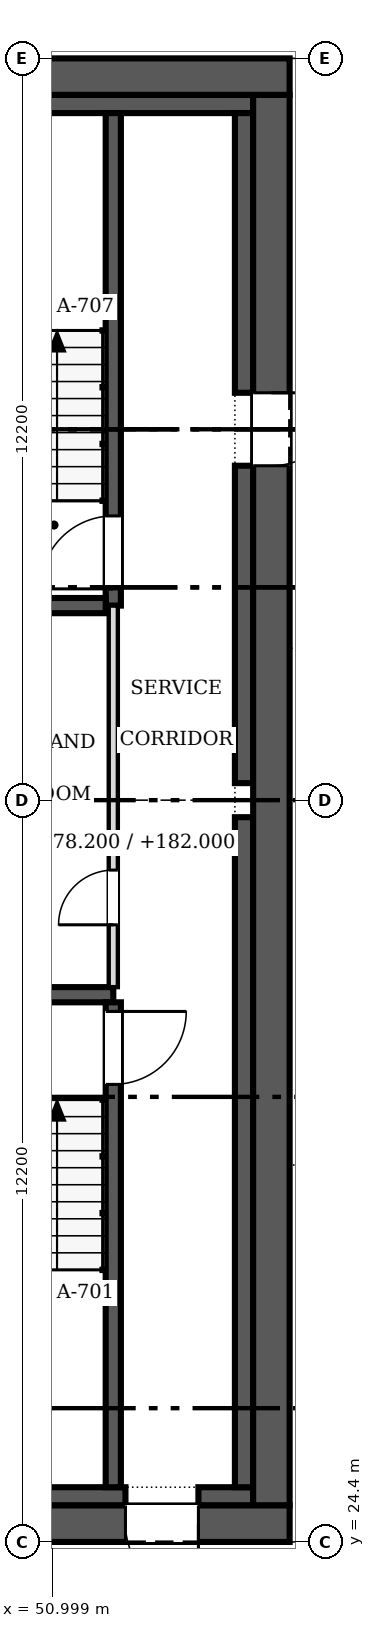
"""IFC4 building model, lengths in metres.
Left out: names, types, materials, properties, quantities, classifications, styles, units other than length and angle.
Written with IfcOpenShell. Run it as: python <this file> out.ifc"""

import sys

from ifc_helpers import new_model, si_unit, direction, frame, frame_2d, origin, place, context, subcontext, project, spatial, rectangle, extrude, source, transform, mapped, element, fill, save


model = new_model("IFC4")
c1 = context("Model", 3, precision=1e-05, world=origin(), true_north=direction((0.0, 1.0)))
c2 = subcontext(c1, "Body", "Model", "MODEL_VIEW")
j1 = project(units=[si_unit("LENGTHUNIT", "METRE"), si_unit("PLANEANGLEUNIT", "RADIAN")], contexts=[c1])
p1 = place(None, origin())
s1 = spatial("IfcSite", under=j1, at=p1, CompositionType="ELEMENT")
p2 = place(p1, origin())
s2 = spatial("IfcBuilding", under=s1, at=p2, CompositionType="ELEMENT")
p3 = place(p2, frame((0.0, 0.0, 178.2)))
s3 = spatial("IfcBuildingStorey", under=s2, at=p3, CompositionType="ELEMENT", Elevation=178.2)
p4 = place(p3, frame((54.9, 24.7, 0.0), z_axis=(0.0, 0.0, 1.0), x_axis=(-1.0, 0.0, 0.0)))
e1 = element("IfcWall", 1, at=p4, inside=s3, PredefinedType="SHEAR", context=c2, shape_type="SweptSolid", body=[
    extrude(rectangle(XDim=24.4, YDim=0.6, at=frame_2d((12.2, 0.0))), origin(), (0.0, 0.0, 1.0), 3.8),
])
m1 = source(origin(), c2, "Body", "SweptSolid", [
    extrude(rectangle(XDim=1.2, YDim=2.1, at=frame_2d((0.6, 1.05))), frame((0.0, 0.31, 0.0), z_axis=(0.0, -1.0, 0.0), x_axis=(1.0, 0.0, 0.0)), (0.0, 0.0, 1.0), 0.62),
])
p5 = place(p4, frame((1.5, 0.0, 0.0)))
e2 = element("IfcOpeningElement", 2, at=p5, cuts=e1, PredefinedType="OPENING", context=c2, shape_type="MappedRepresentation", body=[
    mapped(m1, transform((0.0, 0.0, 0.0), scale=1.0)),
])
p6 = place(p3, frame((30.5, 48.5, 0.0), z_axis=(0.0, 0.0, 1.0), x_axis=(1.0, 0.0, 0.0)))
e3 = element("IfcWall", 3, at=p6, inside=s3, PredefinedType="SHEAR", context=c2, shape_type="SweptSolid", body=[
    extrude(rectangle(XDim=24.4, YDim=0.6, at=frame_2d((12.2, 0.0))), origin(), (0.0, 0.0, 1.0), 3.8),
])
p7 = place(p3, frame((54.6, 48.2, 0.0), z_axis=(0.0, 0.0, 1.0), x_axis=(0.0, -1.0, 0.0)))
e4 = element("IfcWall", 4, at=p7, inside=s3, PredefinedType="SHEAR", context=c2, shape_type="SweptSolid", body=[
    extrude(rectangle(XDim=23.2, YDim=0.6, at=frame_2d((11.6, 0.0))), origin(), (0.0, 0.0, 1.0), 3.8),
])
p8 = place(p7, frame((4.9, 0.0, 0.0)))
e5 = element("IfcOpeningElement", 5, at=p8, cuts=e4, PredefinedType="OPENING", context=c2, shape_type="MappedRepresentation", body=[
    mapped(m1, transform((0.0, 0.0, 0.0), scale=1.0)),
])
p9 = place(p3, frame((31.1, 25.15, 0.0), z_axis=(0.0, 0.0, 1.0), x_axis=(1.0, 0.0, 0.0)))
e6 = element("IfcWall", 6, at=p9, inside=s3, PredefinedType="SOLIDWALL", context=c2, shape_type="SweptSolid", body=[
    extrude(rectangle(XDim=21.1, YDim=0.3, at=frame_2d((10.55, 0.0))), origin(), (0.0, 0.0, 1.0), 3.8),
])
p10 = place(p3, frame((53.4, 25.15, 0.0), z_axis=(0.0, 0.0, 1.0), x_axis=(1.0, 0.0, 0.0)))
e7 = element("IfcWall", 7, at=p10, inside=s3, PredefinedType="SOLIDWALL", context=c2, shape_type="SweptSolid", body=[
    extrude(rectangle(XDim=0.9, YDim=0.3, at=frame_2d((0.45, 0.0))), origin(), (0.0, 0.0, 1.0), 3.8),
])
p11 = place(p3, frame((31.1, 48.05, 0.0), z_axis=(0.0, 0.0, 1.0), x_axis=(1.0, 0.0, 0.0)))
e8 = element("IfcWall", 8, at=p11, inside=s3, PredefinedType="SOLIDWALL", context=c2, shape_type="SweptSolid", body=[
    extrude(rectangle(XDim=23.2, YDim=0.3, at=frame_2d((11.6, 0.0))), origin(), (0.0, 0.0, 1.0), 3.8),
])
p12 = place(p3, frame((54.15, 25.3, 0.0), z_axis=(0.0, 0.0, 1.0), x_axis=(0.0, 1.0, 0.0)))
e9 = element("IfcWall", 9, at=p12, inside=s3, PredefinedType="SOLIDWALL", context=c2, shape_type="SweptSolid", body=[
    extrude(rectangle(XDim=11.02, YDim=0.3, at=frame_2d((5.51, 0.0))), origin(), (0.0, 0.0, 1.0), 3.8),
])
p13 = place(p3, frame((54.15, 36.88, 0.0), z_axis=(0.0, 0.0, 1.0), x_axis=(0.0, 1.0, 0.0)))
e10 = element("IfcWall", 10, at=p13, inside=s3, PredefinedType="SOLIDWALL", context=c2, shape_type="SweptSolid", body=[
    extrude(rectangle(XDim=5.22, YDim=0.3, at=frame_2d((2.61, 0.0))), origin(), (0.0, 0.0, 1.0), 3.8),
])
p14 = place(p3, frame((54.15, 43.3, 0.0), z_axis=(0.0, 0.0, 1.0), x_axis=(0.0, 1.0, 0.0)))
e11 = element("IfcWall", 11, at=p14, inside=s3, PredefinedType="SOLIDWALL", context=c2, shape_type="SweptSolid", body=[
    extrude(rectangle(XDim=4.6, YDim=0.3, at=frame_2d((2.3, 0.0))), origin(), (0.0, 0.0, 1.0), 3.8),
])
p15 = place(p3, frame((48.475, 33.4, 0.0), z_axis=(0.0, 0.0, 1.0), x_axis=(1.0, 0.0, 0.0)))
e12 = element("IfcWall", 12, at=p15, inside=s3, PredefinedType="SOLIDWALL", context=c2, shape_type="SweptSolid", body=[
    extrude(rectangle(XDim=3.525, YDim=0.25, at=frame_2d((1.762, 0.0))), origin(), (0.0, 0.0, 1.0), 3.8),
])
p16 = place(p3, frame((52.0, 25.3, 0.0), z_axis=(0.0, 0.0, 1.0), x_axis=(0.0, 1.0, 0.0)))
e13 = element("IfcWall", 13, at=p16, inside=s3, PredefinedType="SOLIDWALL", context=c2, shape_type="SweptSolid", body=[
    extrude(rectangle(XDim=7.975, YDim=0.25, at=frame_2d((3.987, 0.0))), origin(), (0.0, 0.0, 1.0), 3.8),
])
m2 = source(origin(), c2, "Body", "SweptSolid", [
    extrude(rectangle(XDim=1.2, YDim=2.1, at=frame_2d((0.6, 1.05))), frame((0.0, 0.135, 0.0), z_axis=(0.0, -1.0, 0.0), x_axis=(1.0, 0.0, 0.0)), (0.0, 0.0, 1.0), 0.27),
])
p17 = place(p16, frame((6.625, 0.0, 0.0)))
e14 = element("IfcOpeningElement", 14, at=p17, cuts=e13, PredefinedType="OPENING", context=c2, shape_type="MappedRepresentation", body=[
    mapped(m2, transform((0.0, 0.0, 0.0), scale=1.0)),
])
p18 = place(p3, frame((52.0, 39.8, 0.0), z_axis=(0.0, 0.0, 1.0), x_axis=(0.0, 1.0, 0.0)))
e15 = element("IfcWall", 15, at=p18, inside=s3, PredefinedType="SOLIDWALL", context=c2, shape_type="SweptSolid", body=[
    extrude(rectangle(XDim=8.1, YDim=0.25, at=frame_2d((4.05, 0.0))), origin(), (0.0, 0.0, 1.0), 3.8),
])
p19 = place(p18, frame((0.275, 0.0, 0.0)))
e16 = element("IfcOpeningElement", 16, at=p19, cuts=e15, PredefinedType="OPENING", context=c2, shape_type="MappedRepresentation", body=[
    mapped(m2, transform((0.0, 0.0, 0.0), scale=1.0)),
])
p20 = place(p3, frame((48.475, 39.8, 0.0), z_axis=(0.0, 0.0, 1.0), x_axis=(1.0, 0.0, 0.0)))
e17 = element("IfcWall", 17, at=p20, inside=s3, PredefinedType="SOLIDWALL", context=c2, shape_type="SweptSolid", body=[
    extrude(rectangle(XDim=3.4, YDim=0.25, at=frame_2d((1.7, 0.0))), origin(), (0.0, 0.0, 1.0), 3.8),
])
p21 = place(p3, frame((52.0, 33.525, 0.0), z_axis=(0.0, 0.0, 1.0), x_axis=(0.0, 1.0, 0.0)))
e18 = element("IfcWall", 18, at=p21, inside=s3, PredefinedType="PARTITIONING", context=c2, shape_type="SweptSolid", body=[
    extrude(rectangle(XDim=6.275, YDim=0.15, at=frame_2d((3.138, 0.0))), origin(), (0.0, 0.0, 1.0), 3.6),
])
m3 = source(origin(), c2, "Body", "SweptSolid", [
    extrude(rectangle(XDim=0.9, YDim=2.1, at=frame_2d((0.45, 1.05))), frame((0.0, 0.085, 0.0), z_axis=(0.0, -1.0, 0.0), x_axis=(1.0, 0.0, 0.0)), (0.0, 0.0, 1.0), 0.17),
])
p22 = place(p21, frame((1.025, 0.0, 0.0)))
e19 = element("IfcOpeningElement", 19, at=p22, cuts=e18, PredefinedType="OPENING", context=c2, shape_type="MappedRepresentation", body=[
    mapped(m3, transform((0.0, 0.0, 0.0), scale=1.0)),
])
m4 = source(origin(), c2, "Body", "SweptSolid", [
    extrude(rectangle(XDim=1.2, YDim=2.1, at=frame_2d((0.6, 1.05))), frame((0.0, 0.025, 0.0), z_axis=(0.0, -1.0, 0.0), x_axis=(1.0, 0.0, 0.0)), (0.0, 0.0, 1.0), 0.05),
])
p23 = place(p5, origin())
e20 = element("IfcDoor", 20, at=p23, inside=s3, OperationType="SINGLE_SWING_LEFT", PredefinedType="DOOR", context=c2, shape_type="MappedRepresentation", body=[
    mapped(m4, transform((0.0, 0.0, 0.0), scale=1.0)),
])
fill(e2, e20)
p24 = place(p8, origin())
e21 = element("IfcDoor", 21, at=p24, inside=s3, OperationType="SINGLE_SWING_LEFT", PredefinedType="DOOR", context=c2, shape_type="MappedRepresentation", body=[
    mapped(m4, transform((0.0, 0.0, 0.0), scale=1.0)),
])
fill(e5, e21)
p25 = place(p17, origin())
e22 = element("IfcDoor", 22, at=p25, inside=s3, OperationType="SINGLE_SWING_RIGHT", PredefinedType="DOOR", context=c2, shape_type="MappedRepresentation", body=[
    mapped(m4, transform((0.0, 0.0, 0.0), scale=1.0)),
])
fill(e14, e22)
p26 = place(p19, origin())
e23 = element("IfcDoor", 23, at=p26, inside=s3, OperationType="SINGLE_SWING_LEFT", PredefinedType="DOOR", context=c2, shape_type="MappedRepresentation", body=[
    mapped(m4, transform((0.0, 0.0, 0.0), scale=1.0)),
])
fill(e16, e23)
m5 = source(origin(), c2, "Body", "SweptSolid", [
    extrude(rectangle(XDim=0.9, YDim=2.1, at=frame_2d((0.45, 1.05))), frame((0.0, 0.025, 0.0), z_axis=(0.0, -1.0, 0.0), x_axis=(1.0, 0.0, 0.0)), (0.0, 0.0, 1.0), 0.05),
])
p27 = place(p22, origin())
e24 = element("IfcDoor", 24, at=p27, inside=s3, OperationType="SINGLE_SWING_LEFT", PredefinedType="DOOR", context=c2, shape_type="MappedRepresentation", body=[
    mapped(m5, transform((0.0, 0.0, 0.0), scale=1.0)),
])
fill(e19, e24)
save(model, sys.argv[1])
